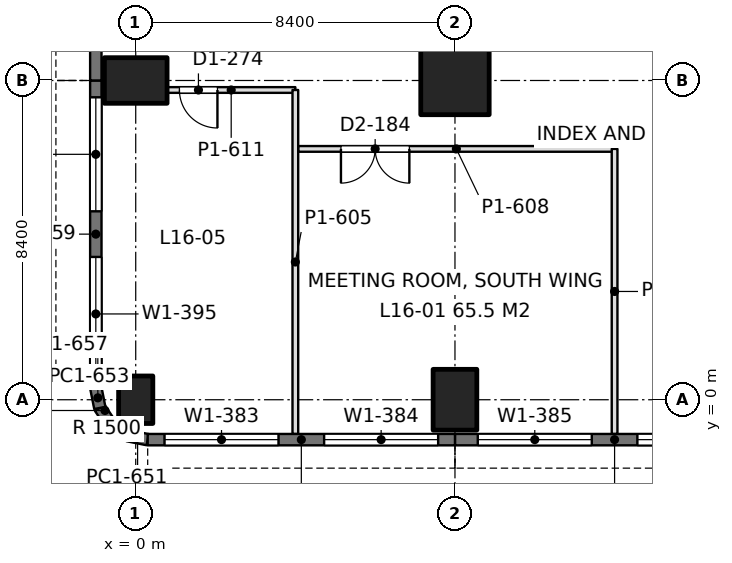
"""IFC4 building model, lengths in metres.
Left out: names, types, materials, properties, quantities, classifications, styles, units other than length and angle.
Written with IfcOpenShell. Run it as: python <this file> out.ifc"""

import sys

from ifc_helpers import new_model, si_unit, direction, frame, frame_2d, origin, origin_with_axes, origin_2d, place, context, subcontext, project, spatial, rectangle, extrude, element, fill, save


model = new_model("IFC4")
c1 = context("Model", 3, precision=1e-05, world=origin(), true_north=direction((0.0, 1.0)))
c2 = subcontext(c1, "Body", "Model", "MODEL_VIEW")
j1 = project(units=[si_unit("LENGTHUNIT", "METRE"), si_unit("PLANEANGLEUNIT", "RADIAN")], contexts=[c1])
p1 = place(None, origin())
s1 = spatial("IfcSite", under=j1, at=p1, CompositionType="ELEMENT")
p2 = place(p1, origin())
s2 = spatial("IfcBuilding", under=s1, at=p2, CompositionType="ELEMENT")
p3 = place(p2, frame((0.0, 0.0, 72.9)))
s3 = spatial("IfcBuildingStorey", under=s2, at=p3, CompositionType="ELEMENT", Elevation=72.9)
p4 = place(p3, origin_with_axes())
e1 = element("IfcColumn", 1, at=p4, inside=s3, PredefinedType="COLUMN", context=c2, shape_type="SweptSolid", body=[
    extrude(rectangle(XDim=0.9, YDim=1.25, at=origin_2d()), origin(), (0.0, 0.0, 1.0), 4.5),
])
p5 = place(p3, frame((0.0, 8.4, 0.0), z_axis=(0.0, 0.0, 1.0), x_axis=(0.0, 1.0, 0.0)))
e2 = element("IfcColumn", 2, at=p5, inside=s3, PredefinedType="COLUMN", context=c2, shape_type="SweptSolid", body=[
    extrude(rectangle(XDim=1.2, YDim=1.65, at=origin_2d()), origin(), (0.0, 0.0, 1.0), 4.5),
])
p6 = place(p3, frame((8.4, 0.0, 0.0), z_axis=(0.0, 0.0, 1.0), x_axis=(1.0, 0.0, 0.0)))
e3 = element("IfcColumn", 3, at=p6, inside=s3, PredefinedType="COLUMN", context=c2, shape_type="SweptSolid", body=[
    extrude(rectangle(XDim=1.15, YDim=1.6, at=origin_2d()), origin(), (0.0, 0.0, 1.0), 4.5),
])
p7 = place(p3, frame((8.4, 8.4, 0.0), z_axis=(0.0, 0.0, 1.0), x_axis=(1.0, 0.0, 0.0)))
e4 = element("IfcColumn", 4, at=p7, inside=s3, PredefinedType="COLUMN", context=c2, shape_type="SweptSolid", body=[
    extrude(rectangle(XDim=1.8, YDim=1.8, at=origin_2d()), origin(), (0.0, 0.0, 1.0), 4.5),
])
p8 = place(p3, frame((16.8, -1.05, 0.0), z_axis=(0.0, 0.0, 1.0), x_axis=(-1.0, 0.0, 0.0)))
e5 = element("IfcWall", 5, at=p8, inside=s3, PredefinedType="SOLIDWALL", context=c2, shape_type="SweptSolid", body=[
    extrude(rectangle(XDim=8.4, YDim=0.3, at=frame_2d((4.2, 0.0))), origin(), (0.0, 0.0, 1.0), 4.34),
])
p9 = place(p8, frame((0.6, 0.0, 0.9)))
e6 = element("IfcOpeningElement", 6, at=p9, cuts=e5, PredefinedType="OPENING", context=c2, shape_type="SweptSolid", body=[
    extrude(rectangle(XDim=3.0, YDim=1.9, at=frame_2d((1.5, 0.95))), frame((0.0, 0.16, 0.0), z_axis=(0.0, -1.0, 0.0), x_axis=(1.0, 0.0, 0.0)), (0.0, 0.0, 1.0), 0.32),
])
p10 = place(p8, frame((4.8, 0.0, 0.9)))
e7 = element("IfcOpeningElement", 7, at=p10, cuts=e5, PredefinedType="OPENING", context=c2, shape_type="SweptSolid", body=[
    extrude(rectangle(XDim=3.0, YDim=1.9, at=frame_2d((1.5, 0.95))), frame((0.0, 0.16, 0.0), z_axis=(0.0, -1.0, 0.0), x_axis=(1.0, 0.0, 0.0)), (0.0, 0.0, 1.0), 0.32),
])
p11 = place(p3, frame((8.4, -1.05, 0.0), z_axis=(0.0, 0.0, 1.0), x_axis=(-1.0, 0.0, 0.0)))
e8 = element("IfcWall", 8, at=p11, inside=s3, PredefinedType="SOLIDWALL", context=c2, shape_type="SweptSolid", body=[
    extrude(rectangle(XDim=8.085, YDim=0.3, at=frame_2d((4.042, 0.0))), origin(), (0.0, 0.0, 1.0), 4.34),
])
p12 = place(p11, frame((0.443, 0.0, 0.9)))
e9 = element("IfcOpeningElement", 9, at=p12, cuts=e8, PredefinedType="OPENING", context=c2, shape_type="SweptSolid", body=[
    extrude(rectangle(XDim=3.0, YDim=1.9, at=frame_2d((1.5, 0.95))), frame((0.0, 0.16, 0.0), z_axis=(0.0, -1.0, 0.0), x_axis=(1.0, 0.0, 0.0)), (0.0, 0.0, 1.0), 0.32),
])
p13 = place(p11, frame((4.643, 0.0, 0.9)))
e10 = element("IfcOpeningElement", 10, at=p13, cuts=e8, PredefinedType="OPENING", context=c2, shape_type="SweptSolid", body=[
    extrude(rectangle(XDim=3.0, YDim=1.9, at=frame_2d((1.5, 0.95))), frame((0.0, 0.16, 0.0), z_axis=(0.0, -1.0, 0.0), x_axis=(1.0, 0.0, 0.0)), (0.0, 0.0, 1.0), 0.32),
])
p14 = place(p3, frame((0.315, -1.05, 0.0), z_axis=(0.0, 0.0, 1.0), x_axis=(-0.980788534345, 0.195073962632, 0.0)))
e11 = element("IfcWall", 11, at=p14, inside=s3, PredefinedType="SOLIDWALL", context=c2, shape_type="SweptSolid", body=[
    extrude(rectangle(XDim=0.541, YDim=0.3, at=frame_2d((0.271, 0.0))), origin(), (0.0, 0.0, 1.0), 4.34),
])
for number, where, z_axis, x_axis in (
    (12, (-0.216, -0.945, 0.0), (0.0, 0.0, 1.0), (-0.831, 0.556, 0.0)),
    (13, (-0.653, -0.653, 0.0), (0.0, 0.0, 1.0), (-0.556, 0.831, 0.0)),
):
    element("IfcWall", number, at=place(p3, frame(where, z_axis=z_axis, x_axis=x_axis)), inside=s3, PredefinedType="SOLIDWALL", context=c2, shape_type="SweptSolid", body=[
        extrude(rectangle(XDim=0.526, YDim=0.3, at=frame_2d((0.263, 0.0))), origin(), (0.0, 0.0, 1.0), 4.34),
    ])
p15 = place(p3, frame((-0.945, -0.216, 0.0), z_axis=(0.0, 0.0, 1.0), x_axis=(-0.195073962632, 0.980788534345, 0.0)))
e14 = element("IfcWall", 14, at=p15, inside=s3, PredefinedType="SOLIDWALL", context=c2, shape_type="SweptSolid", body=[
    extrude(rectangle(XDim=0.541, YDim=0.3, at=frame_2d((0.271, 0.0))), origin(), (0.0, 0.0, 1.0), 4.34),
])
p16 = place(p3, frame((-1.05, 0.315, 0.0), z_axis=(0.0, 0.0, 1.0), x_axis=(0.0, 1.0, 0.0)))
e15 = element("IfcWall", 15, at=p16, inside=s3, PredefinedType="SOLIDWALL", context=c2, shape_type="SweptSolid", body=[
    extrude(rectangle(XDim=8.085, YDim=0.3, at=frame_2d((4.042, 0.0))), origin(), (0.0, 0.0, 1.0), 4.34),
])
p17 = place(p16, frame((0.443, 0.0, 0.9)))
e16 = element("IfcOpeningElement", 16, at=p17, cuts=e15, PredefinedType="OPENING", context=c2, shape_type="SweptSolid", body=[
    extrude(rectangle(XDim=3.0, YDim=1.9, at=frame_2d((1.5, 0.95))), frame((0.0, 0.16, 0.0), z_axis=(0.0, -1.0, 0.0), x_axis=(1.0, 0.0, 0.0)), (0.0, 0.0, 1.0), 0.32),
])
p18 = place(p16, frame((4.643, 0.0, 0.9)))
e17 = element("IfcOpeningElement", 17, at=p18, cuts=e15, PredefinedType="OPENING", context=c2, shape_type="SweptSolid", body=[
    extrude(rectangle(XDim=3.0, YDim=1.9, at=frame_2d((1.5, 0.95))), frame((0.0, 0.16, 0.0), z_axis=(0.0, -1.0, 0.0), x_axis=(1.0, 0.0, 0.0)), (0.0, 0.0, 1.0), 0.32),
])
p19 = place(p3, frame((-1.05, 8.4, 0.0), z_axis=(0.0, 0.0, 1.0), x_axis=(0.0, 1.0, 0.0)))
e18 = element("IfcWall", 18, at=p19, inside=s3, PredefinedType="SOLIDWALL", context=c2, shape_type="SweptSolid", body=[
    extrude(rectangle(XDim=4.2, YDim=0.3, at=frame_2d((2.1, 0.0))), origin(), (0.0, 0.0, 1.0), 4.34),
])
p20 = place(p19, frame((0.9, 0.0, 0.9)))
e19 = element("IfcOpeningElement", 19, at=p20, cuts=e18, PredefinedType="OPENING", context=c2, shape_type="SweptSolid", body=[
    extrude(rectangle(XDim=2.4, YDim=1.9, at=frame_2d((1.2, 0.95))), frame((0.0, 0.16, 0.0), z_axis=(0.0, -1.0, 0.0), x_axis=(1.0, 0.0, 0.0)), (0.0, 0.0, 1.0), 0.32),
])
p21 = place(p3, frame((0.824, 8.15, 0.0), z_axis=(0.0, 0.0, 1.0), x_axis=(1.0, 0.0, 0.0)))
e20 = element("IfcWall", 20, at=p21, inside=s3, PredefinedType="PARTITIONING", context=c2, shape_type="SweptSolid", body=[
    extrude(rectangle(XDim=3.376, YDim=0.15, at=frame_2d((1.688, 0.0))), origin(), (0.0, 0.0, 1.0), 3.84),
])
p22 = place(p21, frame((0.326, 0.0, 0.0)))
e21 = element("IfcOpeningElement", 21, at=p22, cuts=e20, PredefinedType="OPENING", context=c2, shape_type="SweptSolid", body=[
    extrude(rectangle(XDim=1.0, YDim=2.2, at=frame_2d((0.5, 1.1))), frame((0.0, 0.085, 0.0), z_axis=(0.0, -1.0, 0.0), x_axis=(1.0, 0.0, 0.0)), (0.0, 0.0, 1.0), 0.17),
])
p23 = place(p3, frame((4.274, 6.6, 0.0), z_axis=(0.0, 0.0, 1.0), x_axis=(1.0, 0.0, 0.0)))
e22 = element("IfcWall", 22, at=p23, inside=s3, PredefinedType="PARTITIONING", context=c2, shape_type="SweptSolid", body=[
    extrude(rectangle(XDim=8.326, YDim=0.15, at=frame_2d((4.163, 0.0))), origin(), (0.0, 0.0, 1.0), 3.74),
])
p24 = place(p23, frame((1.126, 0.0, 0.0)))
e23 = element("IfcOpeningElement", 23, at=p24, cuts=e22, PredefinedType="OPENING", context=c2, shape_type="SweptSolid", body=[
    extrude(rectangle(XDim=1.8, YDim=2.2, at=frame_2d((0.9, 1.1))), frame((0.0, 0.085, 0.0), z_axis=(0.0, -1.0, 0.0), x_axis=(1.0, 0.0, 0.0)), (0.0, 0.0, 1.0), 0.17),
])
p25 = place(p3, frame((4.2, -0.902, 0.0), z_axis=(0.0, 0.0, 1.0), x_axis=(0.0, 1.0, 0.0)))
e24 = element("IfcWall", 24, at=p25, inside=s3, PredefinedType="PARTITIONING", context=c2, shape_type="SweptSolid", body=[
    extrude(rectangle(XDim=9.052, YDim=0.15, at=frame_2d((4.526, 0.0))), origin(), (0.0, 0.0, 1.0), 3.84),
])
p26 = place(p3, frame((12.6, -0.902, 0.0), z_axis=(0.0, 0.0, 1.0), x_axis=(0.0, 1.0, 0.0)))
e25 = element("IfcWall", 25, at=p26, inside=s3, PredefinedType="PARTITIONING", context=c2, shape_type="SweptSolid", body=[
    extrude(rectangle(XDim=7.502, YDim=0.15, at=frame_2d((3.751, 0.0))), origin(), (0.0, 0.0, 1.0), 3.84),
])
p27 = place(p9, origin())
e26 = element("IfcWindow", 26, at=p27, inside=s3, PartitioningType="SINGLE_PANEL", PredefinedType="WINDOW", context=c2, shape_type="SweptSolid", body=[
    extrude(rectangle(XDim=3.0, YDim=1.9, at=frame_2d((1.5, 0.95))), frame((0.0, 0.03, 0.0), z_axis=(0.0, -1.0, 0.0), x_axis=(1.0, 0.0, 0.0)), (0.0, 0.0, 1.0), 0.06),
])
fill(e6, e26)
p28 = place(p10, origin())
e27 = element("IfcWindow", 27, at=p28, inside=s3, PartitioningType="SINGLE_PANEL", PredefinedType="WINDOW", context=c2, shape_type="SweptSolid", body=[
    extrude(rectangle(XDim=3.0, YDim=1.9, at=frame_2d((1.5, 0.95))), frame((0.0, 0.03, 0.0), z_axis=(0.0, -1.0, 0.0), x_axis=(1.0, 0.0, 0.0)), (0.0, 0.0, 1.0), 0.06),
])
fill(e7, e27)
p29 = place(p12, origin())
e28 = element("IfcWindow", 28, at=p29, inside=s3, PartitioningType="SINGLE_PANEL", PredefinedType="WINDOW", context=c2, shape_type="SweptSolid", body=[
    extrude(rectangle(XDim=3.0, YDim=1.9, at=frame_2d((1.5, 0.95))), frame((0.0, 0.03, 0.0), z_axis=(0.0, -1.0, 0.0), x_axis=(1.0, 0.0, 0.0)), (0.0, 0.0, 1.0), 0.06),
])
fill(e9, e28)
p30 = place(p13, origin())
e29 = element("IfcWindow", 29, at=p30, inside=s3, PartitioningType="SINGLE_PANEL", PredefinedType="WINDOW", context=c2, shape_type="SweptSolid", body=[
    extrude(rectangle(XDim=3.0, YDim=1.9, at=frame_2d((1.5, 0.95))), frame((0.0, 0.03, 0.0), z_axis=(0.0, -1.0, 0.0), x_axis=(1.0, 0.0, 0.0)), (0.0, 0.0, 1.0), 0.06),
])
fill(e10, e29)
p31 = place(p17, origin())
e30 = element("IfcWindow", 30, at=p31, inside=s3, PartitioningType="SINGLE_PANEL", PredefinedType="WINDOW", context=c2, shape_type="SweptSolid", body=[
    extrude(rectangle(XDim=3.0, YDim=1.9, at=frame_2d((1.5, 0.95))), frame((0.0, 0.03, 0.0), z_axis=(0.0, -1.0, 0.0), x_axis=(1.0, 0.0, 0.0)), (0.0, 0.0, 1.0), 0.06),
])
fill(e16, e30)
p32 = place(p18, origin())
e31 = element("IfcWindow", 31, at=p32, inside=s3, PartitioningType="SINGLE_PANEL", PredefinedType="WINDOW", context=c2, shape_type="SweptSolid", body=[
    extrude(rectangle(XDim=3.0, YDim=1.9, at=frame_2d((1.5, 0.95))), frame((0.0, 0.03, 0.0), z_axis=(0.0, -1.0, 0.0), x_axis=(1.0, 0.0, 0.0)), (0.0, 0.0, 1.0), 0.06),
])
fill(e17, e31)
p33 = place(p22, frame((1.0, 0.0, 0.0), z_axis=(0.0, 0.0, 1.0), x_axis=(-1.0, 0.0, 0.0)))
e32 = element("IfcDoor", 32, at=p33, inside=s3, OperationType="SINGLE_SWING_LEFT", PredefinedType="DOOR", context=c2, shape_type="SweptSolid", body=[
    extrude(rectangle(XDim=1.0, YDim=2.2, at=frame_2d((0.5, 1.1))), frame((0.0, 0.025, 0.0), z_axis=(0.0, -1.0, 0.0), x_axis=(1.0, 0.0, 0.0)), (0.0, 0.0, 1.0), 0.05),
])
fill(e21, e32)
p34 = place(p24, frame((1.8, 0.0, 0.0), z_axis=(0.0, 0.0, 1.0), x_axis=(-1.0, 0.0, 0.0)))
e33 = element("IfcDoor", 33, at=p34, inside=s3, OperationType="DOUBLE_DOOR_SINGLE_SWING", PredefinedType="DOOR", context=c2, shape_type="SweptSolid", body=[
    extrude(rectangle(XDim=1.8, YDim=2.2, at=frame_2d((0.9, 1.1))), frame((0.0, 0.025, 0.0), z_axis=(0.0, -1.0, 0.0), x_axis=(1.0, 0.0, 0.0)), (0.0, 0.0, 1.0), 0.05),
])
fill(e23, e33)
save(model, sys.argv[1])
